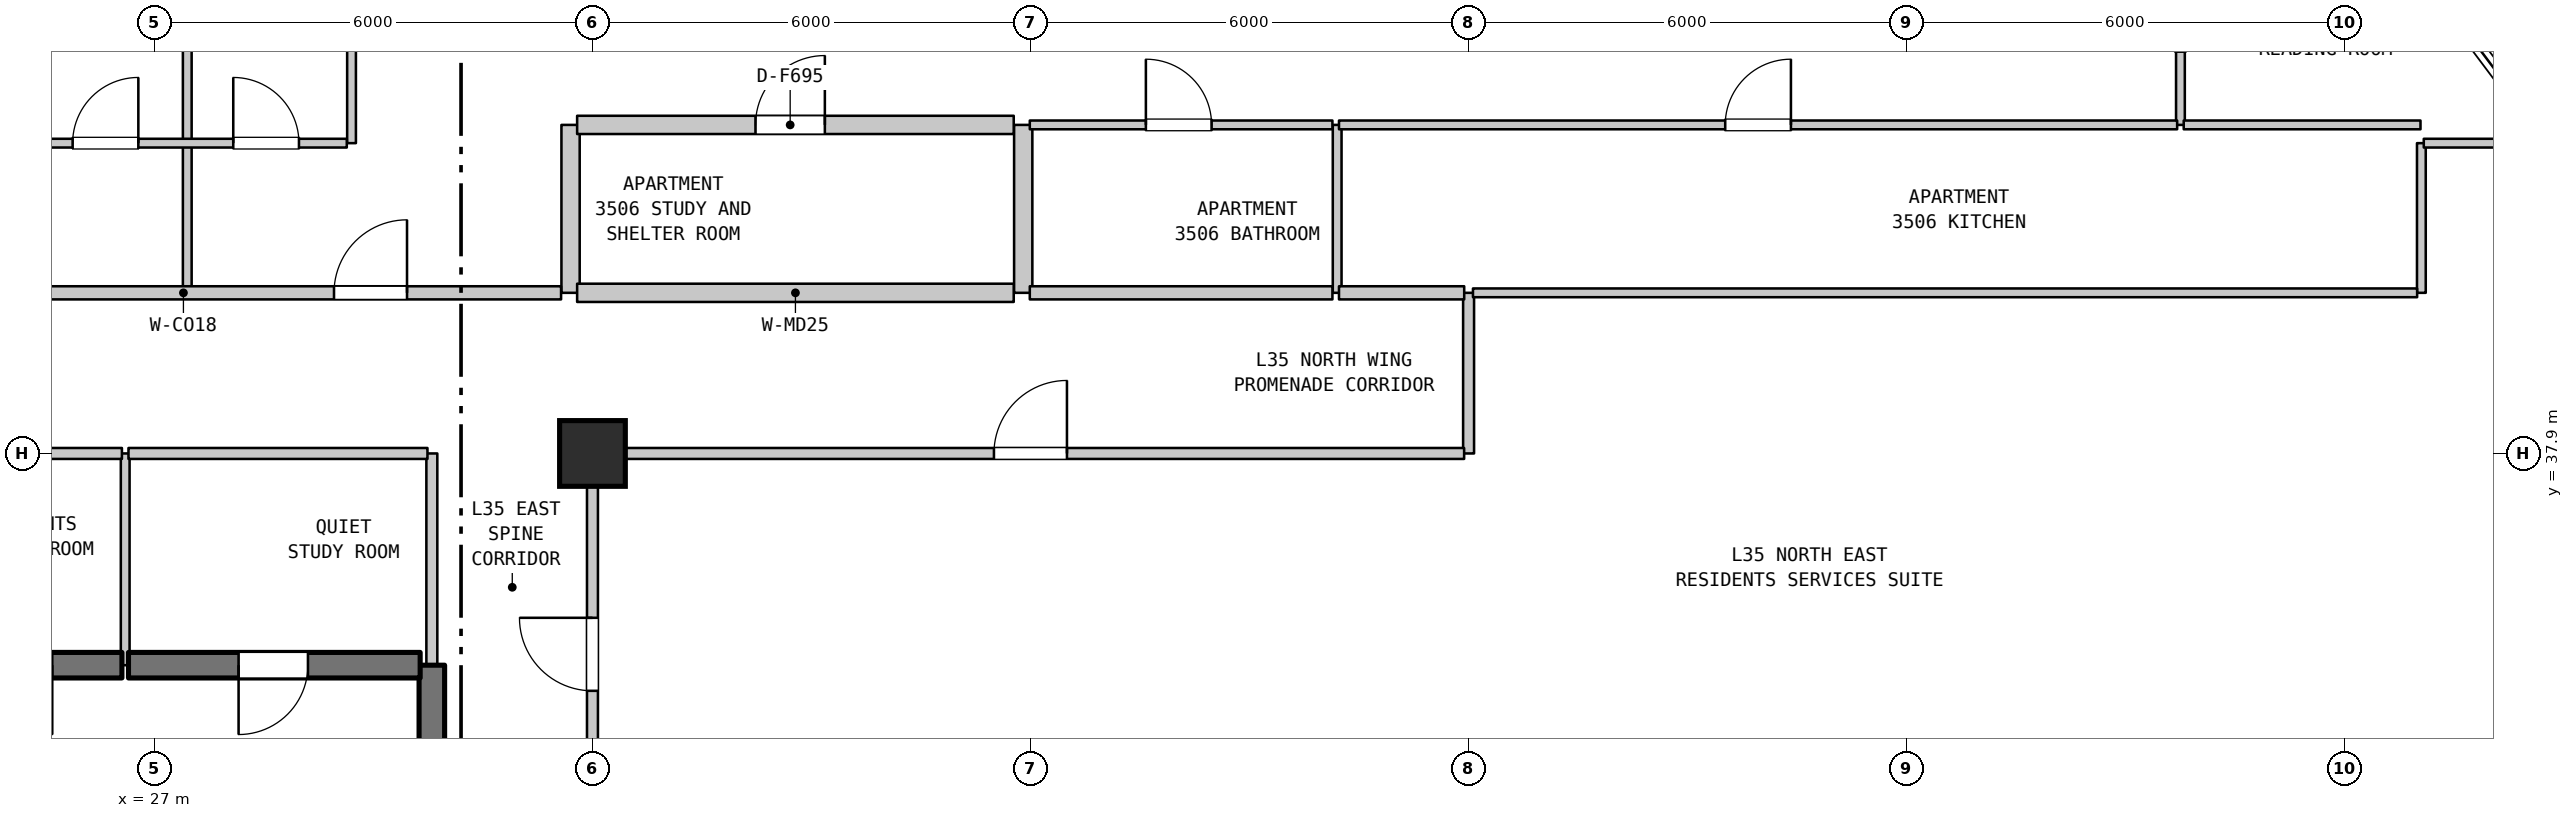
"""IFC4 building model, lengths in metres.
Left out: names, types, materials, properties, quantities, classifications, styles, units other than length and angle.
Written with IfcOpenShell. Run it as: python <this file> out.ifc"""

import sys

from ifc_helpers import new_model, si_unit, direction, frame, frame_2d, origin, origin_2d, place, context, subcontext, project, spatial, rectangle, extrude, element, fill, save


model = new_model("IFC4")
c1 = context("Model", 3, precision=1e-05, world=origin(), true_north=direction((0.0, 1.0)))
c2 = subcontext(c1, "Body", "Model", "MODEL_VIEW")
j1 = project(units=[si_unit("LENGTHUNIT", "METRE"), si_unit("PLANEANGLEUNIT", "RADIAN")], contexts=[c1])
p1 = place(None, origin())
s1 = spatial("IfcSite", under=j1, at=p1, CompositionType="ELEMENT")
p2 = place(p1, origin())
s2 = spatial("IfcBuilding", under=s1, at=p2, CompositionType="ELEMENT")
p3 = place(p2, frame((0.0, 0.0, 144.6)))
s3 = spatial("IfcBuildingStorey", under=s2, at=p3, CompositionType="ELEMENT", Elevation=144.6)
p4 = place(p3, frame((33.0, 37.9, 0.0), z_axis=(0.0, 0.0, 1.0), x_axis=(1.0, 0.0, 0.0)))
e1 = element("IfcColumn", 1, at=p4, inside=s3, PredefinedType="COLUMN", context=c2, shape_type="SweptSolid", body=[
    extrude(rectangle(XDim=0.9, YDim=0.9, at=origin_2d()), origin(), (0.0, 0.0, 1.0), 3.7),
])
p5 = place(p3, frame((26.6, 35.0, 0.0), z_axis=(0.0, 0.0, 1.0), x_axis=(0.0, 1.0, 0.0)))
e2 = element("IfcWall", 2, at=p5, inside=s3, PredefinedType="PARTITIONING", context=c2, shape_type="SweptSolid", body=[
    extrude(rectangle(XDim=2.9, YDim=0.12, at=frame_2d((1.45, 0.0))), origin(), (0.0, 0.0, 1.0), 3.385),
])
p6 = place(p3, frame((27.45, 40.1, 0.0), z_axis=(0.0, 0.0, 1.0), x_axis=(0.0, 1.0, 0.0)))
e3 = element("IfcWall", 3, at=p6, inside=s3, PredefinedType="PARTITIONING", context=c2, shape_type="SweptSolid", body=[
    extrude(rectangle(XDim=2.05, YDim=0.12, at=frame_2d((1.025, 0.0))), origin(), (0.0, 0.0, 1.0), 3.385),
])
p7 = place(p3, frame((27.45, 42.15, 0.0), z_axis=(0.0, 0.0, 1.0), x_axis=(0.0, 1.0, 0.0)))
e4 = element("IfcWall", 4, at=p7, inside=s3, PredefinedType="PARTITIONING", context=c2, shape_type="SweptSolid", body=[
    extrude(rectangle(XDim=11.74, YDim=0.12, at=frame_2d((5.87, 0.0))), origin(), (0.0, 0.0, 1.0), 3.385),
])
p8 = place(p3, frame((29.7, 42.15, 0.0), z_axis=(0.0, 0.0, 1.0), x_axis=(0.0, 1.0, 0.0)))
e5 = element("IfcWall", 5, at=p8, inside=s3, PredefinedType="PARTITIONING", context=c2, shape_type="SweptSolid", body=[
    extrude(rectangle(XDim=3.15, YDim=0.12, at=frame_2d((1.575, 0.0))), origin(), (0.0, 0.0, 1.0), 3.385),
])
p9 = place(p3, frame((30.8, 31.5, 0.0), z_axis=(0.0, 0.0, 1.0), x_axis=(0.0, 1.0, 0.0)))
e6 = element("IfcWall", 6, at=p9, inside=s3, PredefinedType="SHEAR", context=c2, shape_type="SweptSolid", body=[
    extrude(rectangle(XDim=3.5, YDim=0.35, at=frame_2d((1.75, 0.0))), origin(), (0.0, 0.0, 1.0), 3.385),
])
p10 = place(p9, frame((1.15, 0.0, 0.0)))
e7 = element("IfcOpeningElement", 7, at=p10, cuts=e6, PredefinedType="OPENING", context=c2, shape_type="SweptSolid", body=[
    extrude(rectangle(XDim=1.2, YDim=2.2, at=frame_2d((0.6, 1.1))), frame((0.0, 0.185, 0.0), z_axis=(0.0, -1.0, 0.0), x_axis=(1.0, 0.0, 0.0)), (0.0, 0.0, 1.0), 0.37),
])
p11 = place(p3, frame((30.8, 35.0, 0.0), z_axis=(0.0, 0.0, 1.0), x_axis=(0.0, 1.0, 0.0)))
e8 = element("IfcWall", 8, at=p11, inside=s3, PredefinedType="STANDARD", context=c2, shape_type="SweptSolid", body=[
    extrude(rectangle(XDim=2.9, YDim=0.15, at=frame_2d((1.45, 0.0))), origin(), (0.0, 0.0, 1.0), 3.385),
])
p12 = place(p3, frame((32.7, 40.1, 0.0), z_axis=(0.0, 0.0, 1.0), x_axis=(0.0, 1.0, 0.0)))
e9 = element("IfcWall", 9, at=p12, inside=s3, PredefinedType="STANDARD", context=c2, shape_type="SweptSolid", body=[
    extrude(rectangle(XDim=2.3, YDim=0.25, at=frame_2d((1.15, 0.0))), origin(), (0.0, 0.0, 1.0), 3.385),
])
p13 = place(p3, frame((33.0, 32.54, 0.0), z_axis=(0.0, 0.0, 1.0), x_axis=(0.0, 1.0, 0.0)))
e10 = element("IfcWall", 10, at=p13, inside=s3, PredefinedType="STANDARD", context=c2, shape_type="SweptSolid", body=[
    extrude(rectangle(XDim=5.36, YDim=0.15, at=frame_2d((2.68, 0.0))), origin(), (0.0, 0.0, 1.0), 2.885),
])
p14 = place(p13, frame((2.109, 0.0, 0.0)))
e11 = element("IfcOpeningElement", 11, at=p14, cuts=e10, PredefinedType="OPENING", context=c2, shape_type="SweptSolid", body=[
    extrude(rectangle(XDim=1.0, YDim=2.15, at=frame_2d((0.5, 1.075))), frame((0.0, 0.085, 0.0), z_axis=(0.0, -1.0, 0.0), x_axis=(1.0, 0.0, 0.0)), (0.0, 0.0, 1.0), 0.17),
])
p15 = place(p3, frame((38.9, 40.1, 0.0), z_axis=(0.0, 0.0, 1.0), x_axis=(0.0, 1.0, 0.0)))
e12 = element("IfcWall", 12, at=p15, inside=s3, PredefinedType="STANDARD", context=c2, shape_type="SweptSolid", body=[
    extrude(rectangle(XDim=2.3, YDim=0.25, at=frame_2d((1.15, 0.0))), origin(), (0.0, 0.0, 1.0), 3.385),
])
p16 = place(p3, frame((43.2, 40.1, 0.0), z_axis=(0.0, 0.0, 1.0), x_axis=(0.0, 1.0, 0.0)))
e13 = element("IfcWall", 13, at=p16, inside=s3, PredefinedType="PARTITIONING", context=c2, shape_type="SweptSolid", body=[
    extrude(rectangle(XDim=2.3, YDim=0.12, at=frame_2d((1.15, 0.0))), origin(), (0.0, 0.0, 1.0), 3.385),
])
p17 = place(p3, frame((45.0, 37.9, 0.0), z_axis=(0.0, 0.0, 1.0), x_axis=(0.0, 1.0, 0.0)))
e14 = element("IfcWall", 14, at=p17, inside=s3, PredefinedType="STANDARD", context=c2, shape_type="SweptSolid", body=[
    extrude(rectangle(XDim=2.2, YDim=0.15, at=frame_2d((1.1, 0.0))), origin(), (0.0, 0.0, 1.0), 3.385),
])
p18 = place(p3, frame((54.75, 42.4, 0.0), z_axis=(0.0, 0.0, 1.0), x_axis=(0.0, 1.0, 0.0)))
e15 = element("IfcWall", 15, at=p18, inside=s3, PredefinedType="PARTITIONING", context=c2, shape_type="SweptSolid", body=[
    extrude(rectangle(XDim=3.05, YDim=0.12, at=frame_2d((1.525, 0.0))), origin(), (0.0, 0.0, 1.0), 3.385),
])
p19 = place(p18, frame((1.003, 0.0, 0.0)))
e16 = element("IfcOpeningElement", 16, at=p19, cuts=e15, PredefinedType="OPENING", context=c2, shape_type="SweptSolid", body=[
    extrude(rectangle(XDim=0.9, YDim=2.15, at=frame_2d((0.45, 1.075))), frame((0.0, 0.07, 0.0), z_axis=(0.0, -1.0, 0.0), x_axis=(1.0, 0.0, 0.0)), (0.0, 0.0, 1.0), 0.14),
])
p20 = place(p3, frame((58.05, 40.1, 0.0), z_axis=(0.0, 0.0, 1.0), x_axis=(0.0, 1.0, 0.0)))
e17 = element("IfcWall", 17, at=p20, inside=s3, PredefinedType="PARTITIONING", context=c2, shape_type="SweptSolid", body=[
    extrude(rectangle(XDim=2.05, YDim=0.12, at=frame_2d((1.025, 0.0))), origin(), (0.0, 0.0, 1.0), 3.385),
])
p21 = place(p3, frame((23.96, 35.0, 0.0), z_axis=(0.0, 0.0, 1.0), x_axis=(1.0, 0.0, 0.0)))
e18 = element("IfcWall", 18, at=p21, inside=s3, PredefinedType="SHEAR", context=c2, shape_type="SweptSolid", body=[
    extrude(rectangle(XDim=2.595, YDim=0.35, at=frame_2d((1.297, 0.0))), origin(), (0.0, 0.0, 1.0), 3.385),
])
p22 = place(p21, frame((0.691, 0.0, 0.0)))
e19 = element("IfcOpeningElement", 19, at=p22, cuts=e18, PredefinedType="OPENING", context=c2, shape_type="SweptSolid", body=[
    extrude(rectangle(XDim=0.95, YDim=2.15, at=frame_2d((0.475, 1.075))), frame((0.0, 0.185, 0.0), z_axis=(0.0, -1.0, 0.0), x_axis=(1.0, 0.0, 0.0)), (0.0, 0.0, 1.0), 0.37),
])
p23 = place(p3, frame((26.645, 35.0, 0.0), z_axis=(0.0, 0.0, 1.0), x_axis=(1.0, 0.0, 0.0)))
e20 = element("IfcWall", 20, at=p23, inside=s3, PredefinedType="SHEAR", context=c2, shape_type="SweptSolid", body=[
    extrude(rectangle(XDim=3.995, YDim=0.35, at=frame_2d((1.998, 0.0))), origin(), (0.0, 0.0, 1.0), 3.385),
])
p24 = place(p23, frame((1.508, 0.0, 0.0)))
e21 = element("IfcOpeningElement", 21, at=p24, cuts=e20, PredefinedType="OPENING", context=c2, shape_type="SweptSolid", body=[
    extrude(rectangle(XDim=0.95, YDim=2.15, at=frame_2d((0.475, 1.075))), frame((0.0, 0.185, 0.0), z_axis=(0.0, -1.0, 0.0), x_axis=(1.0, 0.0, 0.0)), (0.0, 0.0, 1.0), 0.37),
])
p25 = place(p3, frame((23.96, 37.9, 0.0), z_axis=(0.0, 0.0, 1.0), x_axis=(1.0, 0.0, 0.0)))
e22 = element("IfcWall", 22, at=p25, inside=s3, PredefinedType="STANDARD", context=c2, shape_type="SweptSolid", body=[
    extrude(rectangle(XDim=2.595, YDim=0.15, at=frame_2d((1.297, 0.0))), origin(), (0.0, 0.0, 1.0), 2.885),
])
p26 = place(p3, frame((26.645, 37.9, 0.0), z_axis=(0.0, 0.0, 1.0), x_axis=(1.0, 0.0, 0.0)))
e23 = element("IfcWall", 23, at=p26, inside=s3, PredefinedType="STANDARD", context=c2, shape_type="SweptSolid", body=[
    extrude(rectangle(XDim=4.095, YDim=0.15, at=frame_2d((2.047, 0.0))), origin(), (0.0, 0.0, 1.0), 2.885),
])
p27 = place(p3, frame((33.06, 37.9, 0.0), z_axis=(0.0, 0.0, 1.0), x_axis=(1.0, 0.0, 0.0)))
e24 = element("IfcWall", 24, at=p27, inside=s3, PredefinedType="STANDARD", context=c2, shape_type="SweptSolid", body=[
    extrude(rectangle(XDim=11.879, YDim=0.15, at=frame_2d((5.939, 0.0))), origin(), (0.0, 0.0, 1.0), 3.385),
])
p28 = place(p27, frame((5.439, 0.0, 0.0)))
e25 = element("IfcOpeningElement", 25, at=p28, cuts=e24, PredefinedType="OPENING", context=c2, shape_type="SweptSolid", body=[
    extrude(rectangle(XDim=1.0, YDim=2.15, at=frame_2d((0.5, 1.075))), frame((0.0, 0.085, 0.0), z_axis=(0.0, -1.0, 0.0), x_axis=(1.0, 0.0, 0.0)), (0.0, 0.0, 1.0), 0.17),
])
p29 = place(p3, frame((22.225, 40.1, 0.0), z_axis=(0.0, 0.0, 1.0), x_axis=(1.0, 0.0, 0.0)))
e26 = element("IfcWall", 26, at=p29, inside=s3, PredefinedType="STANDARD", context=c2, shape_type="SweptSolid", body=[
    extrude(rectangle(XDim=10.345, YDim=0.18, at=frame_2d((5.172, 0.0))), origin(), (0.0, 0.0, 1.0), 3.385),
])
p30 = place(p29, frame((2.305, 0.0, 0.0)))
e27 = element("IfcOpeningElement", 27, at=p30, cuts=e26, PredefinedType="OPENING", context=c2, shape_type="SweptSolid", body=[
    extrude(rectangle(XDim=1.0, YDim=2.15, at=frame_2d((0.5, 1.075))), frame((0.0, 0.1, 0.0), z_axis=(0.0, -1.0, 0.0), x_axis=(1.0, 0.0, 0.0)), (0.0, 0.0, 1.0), 0.2),
])
p31 = place(p29, frame((7.235, 0.0, 0.0)))
e28 = element("IfcOpeningElement", 28, at=p31, cuts=e26, PredefinedType="OPENING", context=c2, shape_type="SweptSolid", body=[
    extrude(rectangle(XDim=1.0, YDim=2.15, at=frame_2d((0.5, 1.075))), frame((0.0, 0.1, 0.0), z_axis=(0.0, -1.0, 0.0), x_axis=(1.0, 0.0, 0.0)), (0.0, 0.0, 1.0), 0.2),
])
p32 = place(p3, frame((32.79, 40.1, 0.0), z_axis=(0.0, 0.0, 1.0), x_axis=(1.0, 0.0, 0.0)))
e29 = element("IfcWall", 29, at=p32, inside=s3, PredefinedType="STANDARD", context=c2, shape_type="SweptSolid", body=[
    extrude(rectangle(XDim=5.98, YDim=0.25, at=frame_2d((2.99, 0.0))), origin(), (0.0, 0.0, 1.0), 3.385),
])
p33 = place(p3, frame((38.99, 40.1, 0.0), z_axis=(0.0, 0.0, 1.0), x_axis=(1.0, 0.0, 0.0)))
e30 = element("IfcWall", 30, at=p33, inside=s3, PredefinedType="STANDARD", context=c2, shape_type="SweptSolid", body=[
    extrude(rectangle(XDim=4.145, YDim=0.18, at=frame_2d((2.073, 0.0))), origin(), (0.0, 0.0, 1.0), 3.385),
])
p34 = place(p3, frame((43.225, 40.1, 0.0), z_axis=(0.0, 0.0, 1.0), x_axis=(1.0, 0.0, 0.0)))
e31 = element("IfcWall", 31, at=p34, inside=s3, PredefinedType="STANDARD", context=c2, shape_type="SweptSolid", body=[
    extrude(rectangle(XDim=1.715, YDim=0.18, at=frame_2d((0.857, 0.0))), origin(), (0.0, 0.0, 1.0), 3.385),
])
p35 = place(p3, frame((45.06, 40.1, 0.0), z_axis=(0.0, 0.0, 1.0), x_axis=(1.0, 0.0, 0.0)))
e32 = element("IfcWall", 32, at=p35, inside=s3, PredefinedType="PARTITIONING", context=c2, shape_type="SweptSolid", body=[
    extrude(rectangle(XDim=12.932, YDim=0.12, at=frame_2d((6.466, 0.0))), origin(), (0.0, 0.0, 1.0), 3.385),
])
p36 = place(p3, frame((25.225, 42.15, 0.0), z_axis=(0.0, 0.0, 1.0), x_axis=(1.0, 0.0, 0.0)))
e33 = element("IfcWall", 33, at=p36, inside=s3, PredefinedType="PARTITIONING", context=c2, shape_type="SweptSolid", body=[
    extrude(rectangle(XDim=4.41, YDim=0.12, at=frame_2d((2.205, 0.0))), origin(), (0.0, 0.0, 1.0), 3.385),
])
p37 = place(p36, frame((0.655, 0.0, 0.0)))
e34 = element("IfcOpeningElement", 34, at=p37, cuts=e33, PredefinedType="OPENING", context=c2, shape_type="SweptSolid", body=[
    extrude(rectangle(XDim=0.9, YDim=2.15, at=frame_2d((0.45, 1.075))), frame((0.0, 0.07, 0.0), z_axis=(0.0, -1.0, 0.0), x_axis=(1.0, 0.0, 0.0)), (0.0, 0.0, 1.0), 0.14),
])
p38 = place(p36, frame((2.855, 0.0, 0.0)))
e35 = element("IfcOpeningElement", 35, at=p38, cuts=e33, PredefinedType="OPENING", context=c2, shape_type="SweptSolid", body=[
    extrude(rectangle(XDim=0.9, YDim=2.15, at=frame_2d((0.45, 1.075))), frame((0.0, 0.07, 0.0), z_axis=(0.0, -1.0, 0.0), x_axis=(1.0, 0.0, 0.0)), (0.0, 0.0, 1.0), 0.14),
])
p39 = place(p3, frame((58.083, 42.15, 0.0), z_axis=(0.0, 0.0, 1.0), x_axis=(1.0, 0.0, 0.0)))
e36 = element("IfcWall", 36, at=p39, inside=s3, PredefinedType="PARTITIONING", context=c2, shape_type="SweptSolid", body=[
    extrude(rectangle(XDim=1.72, YDim=0.12, at=frame_2d((0.86, 0.0))), origin(), (0.0, 0.0, 1.0), 3.385),
])
p40 = place(p3, frame((32.79, 42.4, 0.0), z_axis=(0.0, 0.0, 1.0), x_axis=(1.0, 0.0, 0.0)))
e37 = element("IfcWall", 37, at=p40, inside=s3, PredefinedType="STANDARD", context=c2, shape_type="SweptSolid", body=[
    extrude(rectangle(XDim=5.98, YDim=0.25, at=frame_2d((2.99, 0.0))), origin(), (0.0, 0.0, 1.0), 3.385),
])
p41 = place(p40, frame((2.443, 0.0, 0.0)))
e38 = element("IfcOpeningElement", 38, at=p41, cuts=e37, PredefinedType="OPENING", context=c2, shape_type="SweptSolid", body=[
    extrude(rectangle(XDim=0.95, YDim=2.15, at=frame_2d((0.475, 1.075))), frame((0.0, 0.135, 0.0), z_axis=(0.0, -1.0, 0.0), x_axis=(1.0, 0.0, 0.0)), (0.0, 0.0, 1.0), 0.27),
])
p42 = place(p3, frame((38.99, 42.4, 0.0), z_axis=(0.0, 0.0, 1.0), x_axis=(1.0, 0.0, 0.0)))
e39 = element("IfcWall", 39, at=p42, inside=s3, PredefinedType="PARTITIONING", context=c2, shape_type="SweptSolid", body=[
    extrude(rectangle(XDim=4.145, YDim=0.12, at=frame_2d((2.073, 0.0))), origin(), (0.0, 0.0, 1.0), 3.385),
])
p43 = place(p42, frame((1.59, 0.0, 0.0)))
e40 = element("IfcOpeningElement", 40, at=p43, cuts=e39, PredefinedType="OPENING", context=c2, shape_type="SweptSolid", body=[
    extrude(rectangle(XDim=0.9, YDim=2.1, at=frame_2d((0.45, 1.05))), frame((0.0, 0.07, 0.0), z_axis=(0.0, -1.0, 0.0), x_axis=(1.0, 0.0, 0.0)), (0.0, 0.0, 1.0), 0.14),
])
p44 = place(p3, frame((43.225, 42.4, 0.0), z_axis=(0.0, 0.0, 1.0), x_axis=(1.0, 0.0, 0.0)))
e41 = element("IfcWall", 41, at=p44, inside=s3, PredefinedType="PARTITIONING", context=c2, shape_type="SweptSolid", body=[
    extrude(rectangle(XDim=11.48, YDim=0.12, at=frame_2d((5.74, 0.0))), origin(), (0.0, 0.0, 1.0), 3.385),
])
p45 = place(p44, frame((5.29, 0.0, 0.0)))
e42 = element("IfcOpeningElement", 42, at=p45, cuts=e41, PredefinedType="OPENING", context=c2, shape_type="SweptSolid", body=[
    extrude(rectangle(XDim=0.9, YDim=2.15, at=frame_2d((0.45, 1.075))), frame((0.0, 0.07, 0.0), z_axis=(0.0, -1.0, 0.0), x_axis=(1.0, 0.0, 0.0)), (0.0, 0.0, 1.0), 0.14),
])
p46 = place(p3, frame((54.795, 42.4, 0.0), z_axis=(0.0, 0.0, 1.0), x_axis=(1.0, 0.0, 0.0)))
e43 = element("IfcWall", 43, at=p46, inside=s3, PredefinedType="PARTITIONING", context=c2, shape_type="SweptSolid", body=[
    extrude(rectangle(XDim=3.243, YDim=0.12, at=frame_2d((1.622, 0.0))), origin(), (0.0, 0.0, 1.0), 3.385),
])
p47 = place(p14, origin())
e44 = element("IfcDoor", 44, at=p47, inside=s3, OperationType="SINGLE_SWING_RIGHT", PredefinedType="DOOR", context=c2, shape_type="SweptSolid", body=[
    extrude(rectangle(XDim=1.0, YDim=2.15, at=frame_2d((0.5, 1.075))), frame((0.0, 0.025, 0.0), z_axis=(0.0, -1.0, 0.0), x_axis=(1.0, 0.0, 0.0)), (0.0, 0.0, 1.0), 0.05),
])
fill(e11, e44)
p48 = place(p22, frame((0.95, 0.0, 0.0), z_axis=(0.0, 0.0, 1.0), x_axis=(-1.0, 0.0, 0.0)))
e45 = element("IfcDoor", 45, at=p48, inside=s3, OperationType="SINGLE_SWING_RIGHT", PredefinedType="DOOR", context=c2, shape_type="SweptSolid", body=[
    extrude(rectangle(XDim=0.95, YDim=2.15, at=frame_2d((0.475, 1.075))), frame((0.0, 0.025, 0.0), z_axis=(0.0, -1.0, 0.0), x_axis=(1.0, 0.0, 0.0)), (0.0, 0.0, 1.0), 0.05),
])
fill(e19, e45)
p49 = place(p24, frame((0.95, 0.0, 0.0), z_axis=(0.0, 0.0, 1.0), x_axis=(-1.0, 0.0, 0.0)))
e46 = element("IfcDoor", 46, at=p49, inside=s3, OperationType="SINGLE_SWING_LEFT", PredefinedType="DOOR", context=c2, shape_type="SweptSolid", body=[
    extrude(rectangle(XDim=0.95, YDim=2.15, at=frame_2d((0.475, 1.075))), frame((0.0, 0.025, 0.0), z_axis=(0.0, -1.0, 0.0), x_axis=(1.0, 0.0, 0.0)), (0.0, 0.0, 1.0), 0.05),
])
fill(e21, e46)
p50 = place(p28, origin())
e47 = element("IfcDoor", 47, at=p50, inside=s3, OperationType="SINGLE_SWING_RIGHT", PredefinedType="DOOR", context=c2, shape_type="SweptSolid", body=[
    extrude(rectangle(XDim=1.0, YDim=2.15, at=frame_2d((0.5, 1.075))), frame((0.0, 0.025, 0.0), z_axis=(0.0, -1.0, 0.0), x_axis=(1.0, 0.0, 0.0)), (0.0, 0.0, 1.0), 0.05),
])
fill(e25, e47)
p51 = place(p31, origin())
e48 = element("IfcDoor", 48, at=p51, inside=s3, OperationType="SINGLE_SWING_RIGHT", PredefinedType="DOOR", context=c2, shape_type="SweptSolid", body=[
    extrude(rectangle(XDim=1.0, YDim=2.15, at=frame_2d((0.5, 1.075))), frame((0.0, 0.025, 0.0), z_axis=(0.0, -1.0, 0.0), x_axis=(1.0, 0.0, 0.0)), (0.0, 0.0, 1.0), 0.05),
])
fill(e28, e48)
p52 = place(p37, origin())
e49 = element("IfcDoor", 49, at=p52, inside=s3, OperationType="SINGLE_SWING_RIGHT", PredefinedType="DOOR", context=c2, shape_type="SweptSolid", body=[
    extrude(rectangle(XDim=0.9, YDim=2.15, at=frame_2d((0.45, 1.075))), frame((0.0, 0.025, 0.0), z_axis=(0.0, -1.0, 0.0), x_axis=(1.0, 0.0, 0.0)), (0.0, 0.0, 1.0), 0.05),
])
fill(e34, e49)
p53 = place(p38, origin())
e50 = element("IfcDoor", 50, at=p53, inside=s3, OperationType="SINGLE_SWING_LEFT", PredefinedType="DOOR", context=c2, shape_type="SweptSolid", body=[
    extrude(rectangle(XDim=0.9, YDim=2.15, at=frame_2d((0.45, 1.075))), frame((0.0, 0.025, 0.0), z_axis=(0.0, -1.0, 0.0), x_axis=(1.0, 0.0, 0.0)), (0.0, 0.0, 1.0), 0.05),
])
fill(e35, e50)
p54 = place(p41, origin())
e51 = element("IfcDoor", 51, at=p54, inside=s3, OperationType="SINGLE_SWING_RIGHT", PredefinedType="DOOR", context=c2, shape_type="SweptSolid", body=[
    extrude(rectangle(XDim=0.95, YDim=2.15, at=frame_2d((0.475, 1.075))), frame((0.0, 0.025, 0.0), z_axis=(0.0, -1.0, 0.0), x_axis=(1.0, 0.0, 0.0)), (0.0, 0.0, 1.0), 0.05),
])
fill(e38, e51)
p55 = place(p43, origin())
e52 = element("IfcDoor", 52, at=p55, inside=s3, OperationType="SINGLE_SWING_LEFT", PredefinedType="DOOR", context=c2, shape_type="SweptSolid", body=[
    extrude(rectangle(XDim=0.9, YDim=2.1, at=frame_2d((0.45, 1.05))), frame((0.0, 0.025, 0.0), z_axis=(0.0, -1.0, 0.0), x_axis=(1.0, 0.0, 0.0)), (0.0, 0.0, 1.0), 0.05),
])
fill(e40, e52)
p56 = place(p45, origin())
e53 = element("IfcDoor", 53, at=p56, inside=s3, OperationType="SINGLE_SWING_RIGHT", PredefinedType="DOOR", context=c2, shape_type="SweptSolid", body=[
    extrude(rectangle(XDim=0.9, YDim=2.15, at=frame_2d((0.45, 1.075))), frame((0.0, 0.025, 0.0), z_axis=(0.0, -1.0, 0.0), x_axis=(1.0, 0.0, 0.0)), (0.0, 0.0, 1.0), 0.05),
])
fill(e42, e53)
save(model, sys.argv[1])
